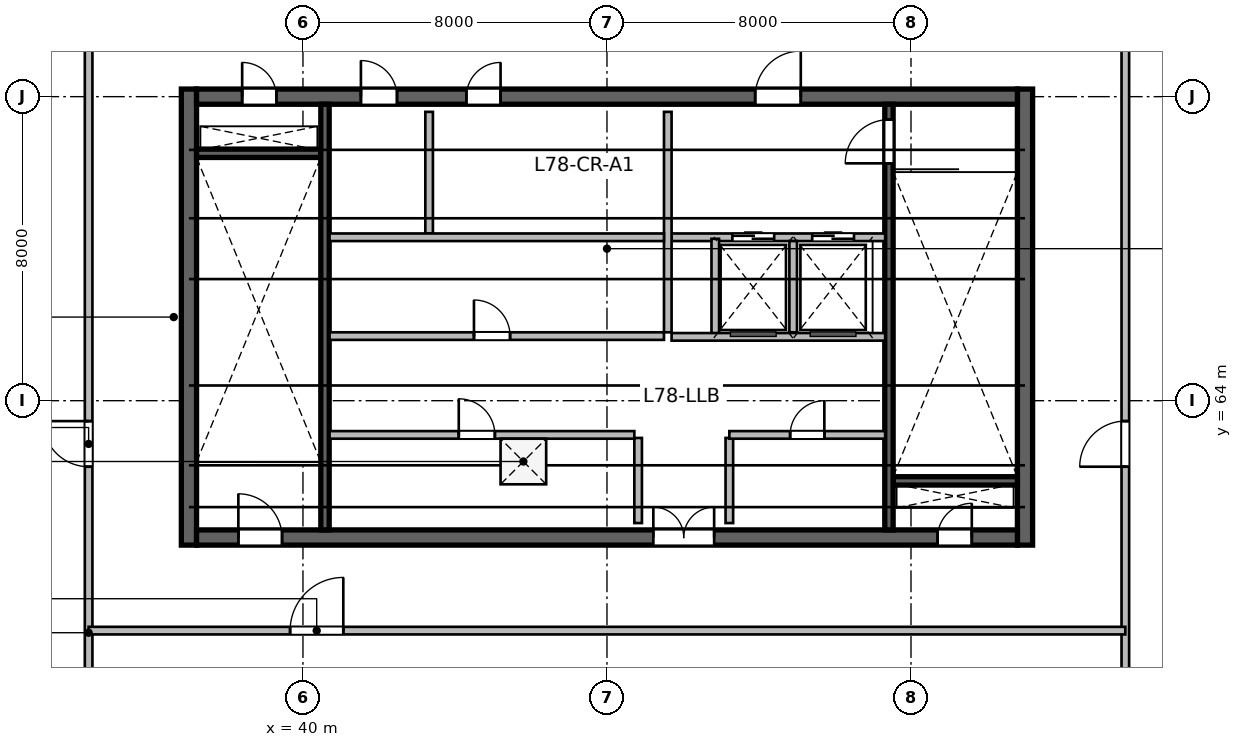
"""IFC4 building model, lengths in metres.
Left out: names, types, materials, properties, quantities, classifications, styles, units other than length and angle.
Written with IfcOpenShell. Run it as: python <this file> out.ifc"""

import sys

from ifc_helpers import new_model, si_unit, direction, frame, frame_2d, origin, origin_2d, place, context, subcontext, project, spatial, rectangle, extrude, source, transform, mapped, element, fill, save


model = new_model("IFC4")
c1 = context("Model", 3, precision=1e-05, world=origin(), true_north=direction((0.0, 1.0)))
c2 = subcontext(c1, "Body", "Model", "MODEL_VIEW")
j1 = project(units=[si_unit("LENGTHUNIT", "METRE"), si_unit("PLANEANGLEUNIT", "RADIAN")], contexts=[c1])
p1 = place(None, origin())
s1 = spatial("IfcSite", under=j1, at=p1, CompositionType="ELEMENT")
p2 = place(p1, origin())
s2 = spatial("IfcBuilding", under=s1, at=p2, CompositionType="ELEMENT")
p3 = place(p2, frame((0.0, 0.0, 323.4)))
s3 = spatial("IfcBuildingStorey", under=s2, at=p3, CompositionType="ELEMENT", Elevation=323.4)
m1 = source(origin(), c2, "Body", "SweptSolid", [
    extrude(rectangle(XDim=12.0, YDim=0.4, at=frame_2d((6.0, 0.0))), origin(), (0.0, 0.0, 1.0), 4.8),
])
for number, where, z_axis, x_axis in (
    (1, (37.0, 60.2, 0.0), (0.0, 0.0, 1.0), (0.0, 1.0, 0.0)),
    (2, (59.0, 60.2, 0.0), (0.0, 0.0, 1.0), (0.0, 1.0, 0.0)),
):
    element("IfcWall", number, at=place(p3, frame(where, z_axis=z_axis, x_axis=x_axis)), inside=s3, PredefinedType="SHEAR", context=c2, shape_type="MappedRepresentation", body=[
        mapped(m1, transform((0.0, 0.0, 0.0), scale=1.0)),
    ])
m2 = source(origin(), c2, "Body", "SweptSolid", [
    extrude(rectangle(XDim=21.6, YDim=0.4, at=frame_2d((10.8, 0.0))), origin(), (0.0, 0.0, 1.0), 4.8),
])
p4 = place(p3, frame((37.2, 60.4, 0.0), z_axis=(0.0, 0.0, 1.0), x_axis=(1.0, 0.0, 0.0)))
e3 = element("IfcWall", 3, at=p4, inside=s3, PredefinedType="SHEAR", context=c2, shape_type="MappedRepresentation", body=[
    mapped(m2, transform((0.0, 0.0, 0.0), scale=1.0)),
])
p5 = place(p4, frame((1.1, 0.0, 0.0)))
e4 = element("IfcOpeningElement", 4, at=p5, cuts=e3, PredefinedType="OPENING", context=c2, shape_type="SweptSolid", body=[
    extrude(rectangle(XDim=1.15, YDim=2.15, at=frame_2d((0.575, 1.075))), frame((0.0, 0.21, 0.0), z_axis=(0.0, -1.0, 0.0), x_axis=(1.0, 0.0, 0.0)), (0.0, 0.0, 1.0), 0.42),
])
p6 = place(p4, frame((19.5, 0.0, 0.0)))
e5 = element("IfcOpeningElement", 5, at=p6, cuts=e3, PredefinedType="OPENING", context=c2, shape_type="SweptSolid", body=[
    extrude(rectangle(XDim=0.9, YDim=2.1, at=frame_2d((0.45, 1.05))), frame((0.0, 0.21, 0.0), z_axis=(0.0, -1.0, 0.0), x_axis=(1.0, 0.0, 0.0)), (0.0, 0.0, 1.0), 0.42),
])
p7 = place(p4, frame((12.02, 0.0, 0.0)))
e6 = element("IfcOpeningElement", 6, at=p7, cuts=e3, PredefinedType="OPENING", context=c2, shape_type="SweptSolid", body=[
    extrude(rectangle(XDim=1.6, YDim=2.15, at=frame_2d((0.8, 1.075))), frame((0.0, 0.21, 0.0), z_axis=(0.0, -1.0, 0.0), x_axis=(1.0, 0.0, 0.0)), (0.0, 0.0, 1.0), 0.42),
])
p8 = place(p3, frame((37.2, 72.0, 0.0), z_axis=(0.0, 0.0, 1.0), x_axis=(1.0, 0.0, 0.0)))
e7 = element("IfcWall", 7, at=p8, inside=s3, PredefinedType="SHEAR", context=c2, shape_type="MappedRepresentation", body=[
    mapped(m2, transform((0.0, 0.0, 0.0), scale=1.0)),
])
p9 = place(p8, frame((1.2, 0.0, 0.0)))
e8 = element("IfcOpeningElement", 8, at=p9, cuts=e7, PredefinedType="OPENING", context=c2, shape_type="SweptSolid", body=[
    extrude(rectangle(XDim=0.9, YDim=2.1, at=frame_2d((0.45, 1.05))), frame((0.0, 0.21, 0.0), z_axis=(0.0, -1.0, 0.0), x_axis=(1.0, 0.0, 0.0)), (0.0, 0.0, 1.0), 0.42),
])
p10 = place(p8, frame((14.7, 0.0, 0.0)))
e9 = element("IfcOpeningElement", 9, at=p10, cuts=e7, PredefinedType="OPENING", context=c2, shape_type="SweptSolid", body=[
    extrude(rectangle(XDim=1.2, YDim=2.15, at=frame_2d((0.6, 1.075))), frame((0.0, 0.21, 0.0), z_axis=(0.0, -1.0, 0.0), x_axis=(1.0, 0.0, 0.0)), (0.0, 0.0, 1.0), 0.42),
])
p11 = place(p8, frame((4.325, 0.0, 0.0)))
e10 = element("IfcOpeningElement", 10, at=p11, cuts=e7, PredefinedType="OPENING", context=c2, shape_type="SweptSolid", body=[
    extrude(rectangle(XDim=0.95, YDim=2.1, at=frame_2d((0.475, 1.05))), frame((0.0, 0.21, 0.0), z_axis=(0.0, -1.0, 0.0), x_axis=(1.0, 0.0, 0.0)), (0.0, 0.0, 1.0), 0.42),
])
p12 = place(p8, frame((7.1, 0.0, 0.0)))
e11 = element("IfcOpeningElement", 11, at=p12, cuts=e7, PredefinedType="OPENING", context=c2, shape_type="SweptSolid", body=[
    extrude(rectangle(XDim=0.9, YDim=2.1, at=frame_2d((0.45, 1.05))), frame((0.0, 0.21, 0.0), z_axis=(0.0, -1.0, 0.0), x_axis=(1.0, 0.0, 0.0)), (0.0, 0.0, 1.0), 0.42),
])
m3 = source(origin(), c2, "Body", "SweptSolid", [
    extrude(rectangle(XDim=3.27, YDim=0.22, at=frame_2d((1.635, 0.0))), origin(), (0.0, 0.0, 1.0), 4.8),
])
for number, where, z_axis, x_axis in (
    (12, (37.2, 70.51, 0.0), (0.0, 0.0, 1.0), (1.0, 0.0, 0.0)),
    (13, (55.53, 61.89, 0.0), (0.0, 0.0, 1.0), (1.0, 0.0, 0.0)),
):
    element("IfcWall", number, at=place(p3, frame(where, z_axis=z_axis, x_axis=x_axis)), inside=s3, PredefinedType="SHEAR", context=c2, shape_type="MappedRepresentation", body=[
        mapped(m3, transform((0.0, 0.0, 0.0), scale=1.0)),
    ])
m4 = source(origin(), c2, "Body", "SweptSolid", [
    extrude(rectangle(XDim=11.2, YDim=0.22, at=frame_2d((5.6, 0.0))), origin(), (0.0, 0.0, 1.0), 4.8),
])
p13 = place(p3, frame((40.58, 60.6, 0.0), z_axis=(0.0, 0.0, 1.0), x_axis=(0.0, 1.0, 0.0)))
e14 = element("IfcWall", 14, at=p13, inside=s3, PredefinedType="SHEAR", context=c2, shape_type="MappedRepresentation", body=[
    mapped(m4, transform((0.0, 0.0, 0.0), scale=1.0)),
])
p14 = place(p3, frame((55.42, 60.6, 0.0), z_axis=(0.0, 0.0, 1.0), x_axis=(0.0, 1.0, 0.0)))
e15 = element("IfcWall", 15, at=p14, inside=s3, PredefinedType="SHEAR", context=c2, shape_type="MappedRepresentation", body=[
    mapped(m4, transform((0.0, 0.0, 0.0), scale=1.0)),
])
p15 = place(p14, frame((9.645, 0.0, 0.0)))
e16 = element("IfcOpeningElement", 16, at=p15, cuts=e15, PredefinedType="OPENING", context=c2, shape_type="SweptSolid", body=[
    extrude(rectangle(XDim=1.15, YDim=2.15, at=frame_2d((0.575, 1.075))), frame((0.0, 0.12, 0.0), z_axis=(0.0, -1.0, 0.0), x_axis=(1.0, 0.0, 0.0)), (0.0, 0.0, 1.0), 0.24),
])
m5 = source(origin(), c2, "Body", "SweptSolid", [
    extrude(rectangle(XDim=1.972, YDim=0.3, at=frame_2d((0.986, 0.0))), origin(), (0.0, 0.0, 1.0), 4.59),
])
for number, where, z_axis, x_axis in (
    (17, (31.648, 72.758, 0.0), (0.0, 0.0, 1.0), (0.878, 0.478, 0.0)),
    (18, (62.62, 73.7, 0.0), (0.0, 0.0, 1.0), (0.878, -0.478, 0.0)),
):
    element("IfcWall", number, at=place(p3, frame(where, z_axis=z_axis, x_axis=x_axis)), inside=s3, PredefinedType="SOLIDWALL", context=c2, shape_type="MappedRepresentation", body=[
        mapped(m5, transform((0.0, 0.0, 0.0), scale=1.0)),
    ])
m6 = source(origin(), c2, "Body", "SweptSolid", [
    extrude(rectangle(XDim=2.24, YDim=0.2, at=frame_2d((1.12, 0.0))), origin(), (0.0, 0.0, 1.0), 4.59),
])
for number, where, z_axis, x_axis in (
    (19, (48.82, 60.78, 0.0), (0.0, 0.0, 1.0), (0.0, 1.0, 0.0)),
    (20, (51.22, 60.78, 0.0), (0.0, 0.0, 1.0), (0.0, 1.0, 0.0)),
):
    element("IfcWall", number, at=place(p3, frame(where, z_axis=z_axis, x_axis=x_axis)), inside=s3, PredefinedType="SOLIDWALL", context=c2, shape_type="MappedRepresentation", body=[
        mapped(m6, transform((0.0, 0.0, 0.0), scale=1.0)),
    ])
m7 = source(origin(), c2, "Body", "SweptSolid", [
    extrude(rectangle(XDim=5.62, YDim=0.2, at=frame_2d((2.81, 0.0))), origin(), (0.0, 0.0, 1.0), 4.59),
])
p16 = place(p3, frame((49.7, 68.3, 0.0), z_axis=(0.0, 0.0, 1.0), x_axis=(1.0, 0.0, 0.0)))
e21 = element("IfcWall", 21, at=p16, inside=s3, PredefinedType="SOLIDWALL", context=c2, shape_type="MappedRepresentation", body=[
    mapped(m7, transform((0.0, 0.0, 0.0), scale=1.0)),
])
p17 = place(p16, frame((1.6, 0.0, 0.0)))
e22 = element("IfcOpeningElement", 22, at=p17, cuts=e21, PredefinedType="OPENING", context=c2, shape_type="SweptSolid", body=[
    extrude(rectangle(XDim=1.1, YDim=2.15, at=frame_2d((0.55, 1.075))), frame((0.0, 0.11, 0.0), z_axis=(0.0, -1.0, 0.0), x_axis=(1.0, 0.0, 0.0)), (0.0, 0.0, 1.0), 0.22),
])
p18 = place(p16, frame((3.7, 0.0, 0.0)))
e23 = element("IfcOpeningElement", 23, at=p18, cuts=e21, PredefinedType="OPENING", context=c2, shape_type="SweptSolid", body=[
    extrude(rectangle(XDim=1.1, YDim=2.15, at=frame_2d((0.55, 1.075))), frame((0.0, 0.11, 0.0), z_axis=(0.0, -1.0, 0.0), x_axis=(1.0, 0.0, 0.0)), (0.0, 0.0, 1.0), 0.22),
])
m8 = source(origin(), c2, "Body", "SweptSolid", [
    extrude(rectangle(XDim=5.8, YDim=0.2, at=frame_2d((2.9, 0.0))), origin(), (0.0, 0.0, 1.0), 4.59),
])
p19 = place(p3, frame((49.6, 65.8, 0.0), z_axis=(0.0, 0.0, 1.0), x_axis=(0.0, 1.0, 0.0)))
e24 = element("IfcWall", 24, at=p19, inside=s3, PredefinedType="SOLIDWALL", context=c2, shape_type="MappedRepresentation", body=[
    mapped(m8, transform((0.0, 0.0, 0.0), scale=1.0)),
])
m9 = source(origin(), c2, "Body", "SweptSolid", [
    extrude(rectangle(XDim=2.58, YDim=0.2, at=frame_2d((1.29, 0.0))), origin(), (0.0, 0.0, 1.0), 4.59),
])
p20 = place(p3, frame((50.85, 65.68, 0.0), z_axis=(0.0, 0.0, 1.0), x_axis=(0.0, 1.0, 0.0)))
e25 = element("IfcWall", 25, at=p20, inside=s3, PredefinedType="SOLIDWALL", context=c2, shape_type="MappedRepresentation", body=[
    mapped(m9, transform((0.0, 0.0, 0.0), scale=1.0)),
])
m10 = source(origin(), c2, "Body", "SweptSolid", [
    extrude(rectangle(XDim=2.4, YDim=0.2, at=frame_2d((1.2, 0.0))), origin(), (0.0, 0.0, 1.0), 4.59),
])
p21 = place(p3, frame((52.9, 65.8, 0.0), z_axis=(0.0, 0.0, 1.0), x_axis=(0.0, 1.0, 0.0)))
e26 = element("IfcWall", 26, at=p21, inside=s3, PredefinedType="SOLIDWALL", context=c2, shape_type="MappedRepresentation", body=[
    mapped(m10, transform((0.0, 0.0, 0.0), scale=1.0)),
])
m11 = source(origin(), c2, "Body", "SweptSolid", [
    extrude(rectangle(XDim=5.62, YDim=0.2, at=frame_2d((2.81, 0.0))), origin(), (0.0, 0.0, 1.0), 3.92),
])
p22 = place(p3, frame((49.7, 65.68, 0.0), z_axis=(0.0, 0.0, 1.0), x_axis=(1.0, 0.0, 0.0)))
e27 = element("IfcWall", 27, at=p22, inside=s3, PredefinedType="SOLIDWALL", context=c2, shape_type="MappedRepresentation", body=[
    mapped(m11, transform((0.0, 0.0, 0.0), scale=1.0)),
])
m12 = source(origin(), c2, "Body", "SweptSolid", [
    extrude(rectangle(XDim=3.2, YDim=0.2, at=frame_2d((1.6, 0.0))), origin(), (0.0, 0.0, 1.0), 4.59),
])
p23 = place(p3, frame((43.32, 68.4, 0.0), z_axis=(0.0, 0.0, 1.0), x_axis=(0.0, 1.0, 0.0)))
e28 = element("IfcWall", 28, at=p23, inside=s3, PredefinedType="SOLIDWALL", context=c2, shape_type="MappedRepresentation", body=[
    mapped(m12, transform((0.0, 0.0, 0.0), scale=1.0)),
])
m13 = source(origin(), c2, "Body", "SweptSolid", [
    extrude(rectangle(XDim=8.8, YDim=0.2, at=frame_2d((4.4, 0.0))), origin(), (0.0, 0.0, 1.0), 4.59),
])
p24 = place(p3, frame((40.7, 68.3, 0.0), z_axis=(0.0, 0.0, 1.0), x_axis=(1.0, 0.0, 0.0)))
e29 = element("IfcWall", 29, at=p24, inside=s3, PredefinedType="SOLIDWALL", context=c2, shape_type="MappedRepresentation", body=[
    mapped(m13, transform((0.0, 0.0, 0.0), scale=1.0)),
])
m14 = source(origin(), c2, "Body", "SweptSolid", [
    extrude(rectangle(XDim=8.02, YDim=0.2, at=frame_2d((4.01, 0.0))), origin(), (0.0, 0.0, 1.0), 3.92),
])
p25 = place(p3, frame((40.7, 63.1, 0.0), z_axis=(0.0, 0.0, 1.0), x_axis=(1.0, 0.0, 0.0)))
e30 = element("IfcWall", 30, at=p25, inside=s3, PredefinedType="SOLIDWALL", context=c2, shape_type="MappedRepresentation", body=[
    mapped(m14, transform((0.0, 0.0, 0.0), scale=1.0)),
])
p26 = place(p25, frame((3.4, 0.0, 0.0)))
e31 = element("IfcOpeningElement", 31, at=p26, cuts=e30, PredefinedType="OPENING", context=c2, shape_type="SweptSolid", body=[
    extrude(rectangle(XDim=0.95, YDim=2.15, at=frame_2d((0.475, 1.075))), frame((0.0, 0.11, 0.0), z_axis=(0.0, -1.0, 0.0), x_axis=(1.0, 0.0, 0.0)), (0.0, 0.0, 1.0), 0.22),
])
m15 = source(origin(), c2, "Body", "SweptSolid", [
    extrude(rectangle(XDim=4.1, YDim=0.2, at=frame_2d((2.05, 0.0))), origin(), (0.0, 0.0, 1.0), 3.92),
])
p27 = place(p3, frame((51.22, 63.1, 0.0), z_axis=(0.0, 0.0, 1.0), x_axis=(1.0, 0.0, 0.0)))
e32 = element("IfcWall", 32, at=p27, inside=s3, PredefinedType="SOLIDWALL", context=c2, shape_type="MappedRepresentation", body=[
    mapped(m15, transform((0.0, 0.0, 0.0), scale=1.0)),
])
p28 = place(p27, frame((1.6, 0.0, 0.0)))
e33 = element("IfcOpeningElement", 33, at=p28, cuts=e32, PredefinedType="OPENING", context=c2, shape_type="SweptSolid", body=[
    extrude(rectangle(XDim=0.9, YDim=2.1, at=frame_2d((0.45, 1.05))), frame((0.0, 0.11, 0.0), z_axis=(0.0, -1.0, 0.0), x_axis=(1.0, 0.0, 0.0)), (0.0, 0.0, 1.0), 0.22),
])
m16 = source(origin(), c2, "Body", "SweptSolid", [
    extrude(rectangle(XDim=8.8, YDim=0.2, at=frame_2d((4.4, 0.0))), origin(), (0.0, 0.0, 1.0), 3.92),
])
p29 = place(p3, frame((40.7, 65.7, 0.0), z_axis=(0.0, 0.0, 1.0), x_axis=(1.0, 0.0, 0.0)))
e34 = element("IfcWall", 34, at=p29, inside=s3, PredefinedType="SOLIDWALL", context=c2, shape_type="MappedRepresentation", body=[
    mapped(m16, transform((0.0, 0.0, 0.0), scale=1.0)),
])
p30 = place(p29, frame((3.8, 0.0, 0.0)))
e35 = element("IfcOpeningElement", 35, at=p30, cuts=e34, PredefinedType="OPENING", context=c2, shape_type="SweptSolid", body=[
    extrude(rectangle(XDim=0.95, YDim=2.15, at=frame_2d((0.475, 1.075))), frame((0.0, 0.11, 0.0), z_axis=(0.0, -1.0, 0.0), x_axis=(1.0, 0.0, 0.0)), (0.0, 0.0, 1.0), 0.22),
])
m17 = source(origin(), c2, "Body", "SweptSolid", [
    extrude(rectangle(XDim=22.582, YDim=0.2, at=frame_2d((11.291, 0.0))), origin(), (0.0, 0.0, 1.0), 4.59),
])
p31 = place(p3, frame((34.36, 51.572, 0.0), z_axis=(0.0, 0.0, 1.0), x_axis=(0.0, 1.0, 0.0)))
e36 = element("IfcWall", 36, at=p31, inside=s3, PredefinedType="SOLIDWALL", context=c2, shape_type="MappedRepresentation", body=[
    mapped(m17, transform((0.0, 0.0, 0.0), scale=1.0)),
])
p32 = place(p31, frame((10.691, 0.0, 0.0)))
e37 = element("IfcOpeningElement", 37, at=p32, cuts=e36, PredefinedType="OPENING", context=c2, shape_type="SweptSolid", body=[
    extrude(rectangle(XDim=1.2, YDim=2.15, at=frame_2d((0.6, 1.075))), frame((0.0, 0.11, 0.0), z_axis=(0.0, -1.0, 0.0), x_axis=(1.0, 0.0, 0.0)), (0.0, 0.0, 1.0), 0.22),
])
p33 = place(p3, frame((61.64, 51.572, 0.0), z_axis=(0.0, 0.0, 1.0), x_axis=(0.0, 1.0, 0.0)))
e38 = element("IfcWall", 38, at=p33, inside=s3, PredefinedType="SOLIDWALL", context=c2, shape_type="MappedRepresentation", body=[
    mapped(m17, transform((0.0, 0.0, 0.0), scale=1.0)),
])
p34 = place(p33, frame((10.691, 0.0, 0.0)))
e39 = element("IfcOpeningElement", 39, at=p34, cuts=e38, PredefinedType="OPENING", context=c2, shape_type="SweptSolid", body=[
    extrude(rectangle(XDim=1.2, YDim=2.15, at=frame_2d((0.6, 1.075))), frame((0.0, 0.11, 0.0), z_axis=(0.0, -1.0, 0.0), x_axis=(1.0, 0.0, 0.0)), (0.0, 0.0, 1.0), 0.22),
])
m18 = source(origin(), c2, "Body", "SweptSolid", [
    extrude(rectangle(XDim=27.28, YDim=0.2, at=frame_2d((13.64, 0.0))), origin(), (0.0, 0.0, 1.0), 4.59),
])
p35 = place(p3, frame((34.36, 57.95, 0.0), z_axis=(0.0, 0.0, 1.0), x_axis=(1.0, 0.0, 0.0)))
e40 = element("IfcWall", 40, at=p35, inside=s3, PredefinedType="SOLIDWALL", context=c2, shape_type="MappedRepresentation", body=[
    mapped(m18, transform((0.0, 0.0, 0.0), scale=1.0)),
])
p36 = place(p35, frame((5.302, 0.0, 0.0)))
e41 = element("IfcOpeningElement", 41, at=p36, cuts=e40, PredefinedType="OPENING", context=c2, shape_type="SweptSolid", body=[
    extrude(rectangle(XDim=1.4, YDim=2.15, at=frame_2d((0.7, 1.075))), frame((0.0, 0.11, 0.0), z_axis=(0.0, -1.0, 0.0), x_axis=(1.0, 0.0, 0.0)), (0.0, 0.0, 1.0), 0.22),
])
p37 = place(p2, frame((0.0, 0.0, 328.2)))
p38 = place(p37, frame((0.0, 0.0, -0.21)))
p39 = place(p38, frame((45.8, 62.4, 0.16)))
e42 = element("IfcDoor", 42, at=p39, inside=s3, OperationType="SINGLE_SWING_LEFT", PredefinedType="TRAPDOOR", context=c2, shape_type="SweptSolid", body=[
    extrude(rectangle(XDim=1.2, YDim=1.2, at=origin_2d()), origin(), (0.0, 0.0, 1.0), 0.05),
])
m19 = source(origin(), c2, "Body", "SweptSolid", [
    extrude(rectangle(XDim=1.15, YDim=2.15, at=frame_2d((0.575, 1.075))), frame((0.0, 0.025, 0.0), z_axis=(0.0, -1.0, 0.0), x_axis=(1.0, 0.0, 0.0)), (0.0, 0.0, 1.0), 0.05),
])
p40 = place(p5, origin())
e43 = element("IfcDoor", 43, at=p40, inside=s3, OperationType="SINGLE_SWING_LEFT", PredefinedType="DOOR", context=c2, shape_type="MappedRepresentation", body=[
    mapped(m19, transform((0.0, 0.0, 0.0), scale=1.0)),
])
fill(e4, e43)
m20 = source(origin(), c2, "Body", "SweptSolid", [
    extrude(rectangle(XDim=0.9, YDim=2.1, at=frame_2d((0.45, 1.05))), frame((0.0, 0.025, 0.0), z_axis=(0.0, -1.0, 0.0), x_axis=(1.0, 0.0, 0.0)), (0.0, 0.0, 1.0), 0.05),
])
p41 = place(p9, origin())
e44 = element("IfcDoor", 44, at=p41, inside=s3, OperationType="SINGLE_SWING_LEFT", PredefinedType="DOOR", context=c2, shape_type="MappedRepresentation", body=[
    mapped(m20, transform((0.0, 0.0, 0.0), scale=1.0)),
])
fill(e8, e44)
p42 = place(p6, origin())
e45 = element("IfcDoor", 45, at=p42, inside=s3, OperationType="SINGLE_SWING_RIGHT", PredefinedType="DOOR", context=c2, shape_type="MappedRepresentation", body=[
    mapped(m20, transform((0.0, 0.0, 0.0), scale=1.0)),
])
fill(e5, e45)
p43 = place(p15, origin())
e46 = element("IfcDoor", 46, at=p43, inside=s3, OperationType="SINGLE_SWING_LEFT", PredefinedType="DOOR", context=c2, shape_type="MappedRepresentation", body=[
    mapped(m19, transform((0.0, 0.0, 0.0), scale=1.0)),
])
fill(e16, e46)
m21 = source(origin(), c2, "Body", "SweptSolid", [
    extrude(rectangle(XDim=1.6, YDim=2.15, at=frame_2d((0.8, 1.075))), frame((0.0, 0.025, 0.0), z_axis=(0.0, -1.0, 0.0), x_axis=(1.0, 0.0, 0.0)), (0.0, 0.0, 1.0), 0.05),
])
p44 = place(p7, origin())
e47 = element("IfcDoor", 47, at=p44, inside=s3, OperationType="DOUBLE_DOOR_SINGLE_SWING", PredefinedType="DOOR", context=c2, shape_type="MappedRepresentation", body=[
    mapped(m21, transform((0.0, 0.0, 0.0), scale=1.0)),
])
fill(e6, e47)
m22 = source(origin(), c2, "Body", "SweptSolid", [
    extrude(rectangle(XDim=1.2, YDim=2.15, at=frame_2d((0.6, 1.075))), frame((0.0, 0.025, 0.0), z_axis=(0.0, -1.0, 0.0), x_axis=(1.0, 0.0, 0.0)), (0.0, 0.0, 1.0), 0.05),
])
p45 = place(p10, origin())
e48 = element("IfcDoor", 48, at=p45, inside=s3, OperationType="SINGLE_SWING_RIGHT", PredefinedType="DOOR", context=c2, shape_type="MappedRepresentation", body=[
    mapped(m22, transform((0.0, 0.0, 0.0), scale=1.0)),
])
fill(e9, e48)
m23 = source(origin(), c2, "Body", "SweptSolid", [
    extrude(rectangle(XDim=1.1, YDim=2.15, at=frame_2d((0.55, 1.075))), frame((0.0, 0.025, 0.0), z_axis=(0.0, -1.0, 0.0), x_axis=(1.0, 0.0, 0.0)), (0.0, 0.0, 1.0), 0.05),
])
p46 = place(p17, origin())
e49 = element("IfcDoor", 49, at=p46, inside=s3, OperationType="DOUBLE_DOOR_SLIDING", PredefinedType="DOOR", context=c2, shape_type="MappedRepresentation", body=[
    mapped(m23, transform((0.0, 0.0, 0.0), scale=1.0)),
])
fill(e22, e49)
p47 = place(p18, origin())
e50 = element("IfcDoor", 50, at=p47, inside=s3, OperationType="DOUBLE_DOOR_SLIDING", PredefinedType="DOOR", context=c2, shape_type="MappedRepresentation", body=[
    mapped(m23, transform((0.0, 0.0, 0.0), scale=1.0)),
])
fill(e23, e50)
m24 = source(origin(), c2, "Body", "SweptSolid", [
    extrude(rectangle(XDim=0.95, YDim=2.1, at=frame_2d((0.475, 1.05))), frame((0.0, 0.025, 0.0), z_axis=(0.0, -1.0, 0.0), x_axis=(1.0, 0.0, 0.0)), (0.0, 0.0, 1.0), 0.05),
])
p48 = place(p11, origin())
e51 = element("IfcDoor", 51, at=p48, inside=s3, OperationType="SINGLE_SWING_LEFT", PredefinedType="DOOR", context=c2, shape_type="MappedRepresentation", body=[
    mapped(m24, transform((0.0, 0.0, 0.0), scale=1.0)),
])
fill(e10, e51)
p49 = place(p12, origin())
e52 = element("IfcDoor", 52, at=p49, inside=s3, OperationType="SINGLE_SWING_RIGHT", PredefinedType="DOOR", context=c2, shape_type="MappedRepresentation", body=[
    mapped(m20, transform((0.0, 0.0, 0.0), scale=1.0)),
])
fill(e11, e52)
m25 = source(origin(), c2, "Body", "SweptSolid", [
    extrude(rectangle(XDim=0.95, YDim=2.15, at=frame_2d((0.475, 1.075))), frame((0.0, 0.025, 0.0), z_axis=(0.0, -1.0, 0.0), x_axis=(1.0, 0.0, 0.0)), (0.0, 0.0, 1.0), 0.05),
])
p50 = place(p26, origin())
e53 = element("IfcDoor", 53, at=p50, inside=s3, OperationType="SINGLE_SWING_LEFT", PredefinedType="DOOR", context=c2, shape_type="MappedRepresentation", body=[
    mapped(m25, transform((0.0, 0.0, 0.0), scale=1.0)),
])
fill(e31, e53)
p51 = place(p28, origin())
e54 = element("IfcDoor", 54, at=p51, inside=s3, OperationType="SINGLE_SWING_RIGHT", PredefinedType="DOOR", context=c2, shape_type="MappedRepresentation", body=[
    mapped(m20, transform((0.0, 0.0, 0.0), scale=1.0)),
])
fill(e33, e54)
p52 = place(p30, origin())
e55 = element("IfcDoor", 55, at=p52, inside=s3, OperationType="SINGLE_SWING_LEFT", PredefinedType="DOOR", context=c2, shape_type="MappedRepresentation", body=[
    mapped(m25, transform((0.0, 0.0, 0.0), scale=1.0)),
])
fill(e35, e55)
p53 = place(p32, origin())
e56 = element("IfcDoor", 56, at=p53, inside=s3, OperationType="SINGLE_SWING_RIGHT", PredefinedType="DOOR", context=c2, shape_type="MappedRepresentation", body=[
    mapped(m22, transform((0.0, 0.0, 0.0), scale=1.0)),
])
fill(e37, e56)
p54 = place(p34, origin())
e57 = element("IfcDoor", 57, at=p54, inside=s3, OperationType="SINGLE_SWING_LEFT", PredefinedType="DOOR", context=c2, shape_type="MappedRepresentation", body=[
    mapped(m22, transform((0.0, 0.0, 0.0), scale=1.0)),
])
fill(e39, e57)
m26 = source(origin(), c2, "Body", "SweptSolid", [
    extrude(rectangle(XDim=1.4, YDim=2.15, at=frame_2d((0.7, 1.075))), frame((0.0, 0.025, 0.0), z_axis=(0.0, -1.0, 0.0), x_axis=(1.0, 0.0, 0.0)), (0.0, 0.0, 1.0), 0.05),
])
p55 = place(p36, origin())
e58 = element("IfcDoor", 58, at=p55, inside=s3, OperationType="SINGLE_SWING_RIGHT", PredefinedType="DOOR", context=c2, shape_type="MappedRepresentation", body=[
    mapped(m26, transform((0.0, 0.0, 0.0), scale=1.0)),
])
fill(e41, e58)
save(model, sys.argv[1])
